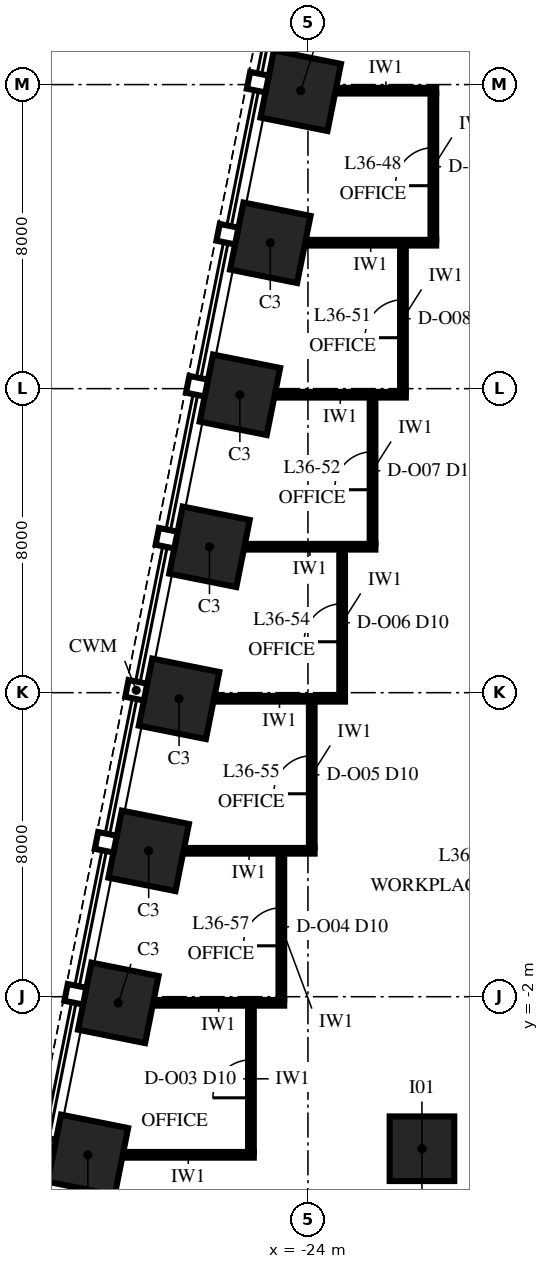
"""IFC4 building model, lengths in metres.
Left out: names, types, materials, properties, quantities, classifications, styles, units other than length and angle.
Written with IfcOpenShell. Run it as: python <this file> out.ifc"""

import sys

from ifc_helpers import new_model, si_unit, direction, frame, frame_2d, origin, origin_2d, place, context, subcontext, project, spatial, rectangle, extrude, element, fill, save


model = new_model("IFC4")
c1 = context("Model", 3, precision=1e-05, world=origin(), true_north=direction((0.0, 1.0)))
c2 = subcontext(c1, "Body", "Model", "MODEL_VIEW")
j1 = project(units=[si_unit("LENGTHUNIT", "METRE"), si_unit("PLANEANGLEUNIT", "RADIAN")], contexts=[c1])
p1 = place(None, origin())
s1 = spatial("IfcSite", under=j1, at=p1, CompositionType="ELEMENT")
p2 = place(p1, origin())
s2 = spatial("IfcBuilding", under=s1, at=p2, CompositionType="ELEMENT")
p3 = place(p2, frame((0.0, 0.0, 159.0)))
s3 = spatial("IfcBuildingStorey", under=s2, at=p3, CompositionType="ELEMENT", Elevation=159.0)
for number, where, z_axis, x_axis in (
    (1, (-24.191, 21.838, 0.0), (0.0, 0.0, 1.0), (-0.196, -0.981, 0.0)),
    (2, (-24.991, 17.838, 0.0), (0.0, 0.0, 1.0), (-0.196, -0.981, 0.0)),
    (3, (-25.791, 13.838, 0.0), (0.0, 0.0, 1.0), (-0.196, -0.981, 0.0)),
    (4, (-26.591, 9.838, 0.0), (0.0, 0.0, 1.0), (-0.196, -0.981, 0.0)),
    (5, (-27.391, 5.838, 0.0), (0.0, 0.0, 1.0), (-0.196, -0.981, 0.0)),
    (6, (-28.191, 1.838, 0.0), (0.0, 0.0, 1.0), (-0.196, -0.981, 0.0)),
    (7, (-28.991, -2.162, 0.0), (0.0, 0.0, 1.0), (-0.196, -0.981, 0.0)),
    (8, (-29.791, -6.162, 0.0), (0.0, 0.0, 1.0), (-0.196, -0.981, 0.0)),
):
    element("IfcColumn", number, at=place(p3, frame(where, z_axis=z_axis, x_axis=x_axis)), inside=s3, PredefinedType="COLUMN", context=c2, shape_type="SweptSolid", body=[
        extrude(rectangle(XDim=1.8, YDim=1.8, at=origin_2d()), origin(), (0.0, 0.0, 1.0), 4.0),
    ])
p4 = place(p3, frame((-21.0, -6.0, 0.0), z_axis=(0.0, 0.0, 1.0), x_axis=(1.0, 0.0, 0.0)))
e9 = element("IfcColumn", 9, at=p4, inside=s3, PredefinedType="COLUMN", context=c2, shape_type="SweptSolid", body=[
    extrude(rectangle(XDim=1.7, YDim=1.7, at=origin_2d()), origin(), (0.0, 0.0, 1.0), 4.0),
])
p5 = place(p3, frame((-28.873, -6.16, 0.0), z_axis=(0.0, 0.0, 1.0), x_axis=(1.0, 0.0, 0.0)))
e10 = element("IfcWall", 10, at=p5, inside=s3, PredefinedType="PARTITIONING", context=c2, shape_type="SweptSolid", body=[
    extrude(rectangle(XDim=3.448, YDim=0.15, at=frame_2d((1.724, 0.0))), origin(), (0.0, 0.0, 1.0), 2.842),
])
for number, where, z_axis, x_axis in (
    (11, (-28.073, -2.16, 0.0), (0.0, 0.0, 1.0), (1.0, 0.0, 0.0)),
    (12, (-27.273, 1.84, 0.0), (0.0, 0.0, 1.0), (1.0, 0.0, 0.0)),
):
    element("IfcWall", number, at=place(p3, frame(where, z_axis=z_axis, x_axis=x_axis)), inside=s3, PredefinedType="PARTITIONING", context=c2, shape_type="SweptSolid", body=[
        extrude(rectangle(XDim=3.448, YDim=0.15, at=frame_2d((1.724, 0.0))), origin(), (0.0, 0.0, 1.0), 3.25),
    ])
p6 = place(p3, frame((-26.473, 5.84, 0.0), z_axis=(0.0, 0.0, 1.0), x_axis=(1.0, 0.0, 0.0)))
e13 = element("IfcWall", 13, at=p6, inside=s3, PredefinedType="PARTITIONING", context=c2, shape_type="SweptSolid", body=[
    extrude(rectangle(XDim=3.448, YDim=0.15, at=frame_2d((1.724, 0.0))), origin(), (0.0, 0.0, 1.0), 2.842),
])
for number, where, z_axis, x_axis in (
    (14, (-25.673, 9.84, 0.0), (0.0, 0.0, 1.0), (1.0, 0.0, 0.0)),
    (15, (-24.873, 13.84, 0.0), (0.0, 0.0, 1.0), (1.0, 0.0, 0.0)),
    (16, (-24.073, 17.84, 0.0), (0.0, 0.0, 1.0), (1.0, 0.0, 0.0)),
):
    element("IfcWall", number, at=place(p3, frame(where, z_axis=z_axis, x_axis=x_axis)), inside=s3, PredefinedType="PARTITIONING", context=c2, shape_type="SweptSolid", body=[
        extrude(rectangle(XDim=3.448, YDim=0.15, at=frame_2d((1.724, 0.0))), origin(), (0.0, 0.0, 1.0), 3.25),
    ])
p7 = place(p3, frame((-23.273, 21.84, 0.0), z_axis=(0.0, 0.0, 1.0), x_axis=(1.0, 0.0, 0.0)))
e17 = element("IfcWall", 17, at=p7, inside=s3, PredefinedType="PARTITIONING", context=c2, shape_type="SweptSolid", body=[
    extrude(rectangle(XDim=2.648, YDim=0.15, at=frame_2d((1.324, 0.0))), origin(), (0.0, 0.0, 1.0), 3.25),
])
p8 = place(p3, frame((-25.5, -6.085, 0.0), z_axis=(0.0, 0.0, 1.0), x_axis=(0.0, 1.0, 0.0)))
e18 = element("IfcWall", 18, at=p8, inside=s3, PredefinedType="PARTITIONING", context=c2, shape_type="SweptSolid", body=[
    extrude(rectangle(XDim=3.85, YDim=0.15, at=frame_2d((1.925, 0.0))), origin(), (0.0, 0.0, 1.0), 2.842),
])
p9 = place(p8, frame((1.425, 0.0, 0.0)))
e19 = element("IfcOpeningElement", 19, at=p9, cuts=e18, PredefinedType="OPENING", context=c2, shape_type="SweptSolid", body=[
    extrude(rectangle(XDim=1.0, YDim=2.3, at=frame_2d((0.5, 1.15))), frame((0.0, 0.09, 0.0), z_axis=(0.0, -1.0, 0.0), x_axis=(1.0, 0.0, 0.0)), (0.0, 0.0, 1.0), 0.18),
])
p10 = place(p3, frame((-24.7, -2.085, 0.0), z_axis=(0.0, 0.0, 1.0), x_axis=(0.0, 1.0, 0.0)))
e20 = element("IfcWall", 20, at=p10, inside=s3, PredefinedType="PARTITIONING", context=c2, shape_type="SweptSolid", body=[
    extrude(rectangle(XDim=3.85, YDim=0.15, at=frame_2d((1.925, 0.0))), origin(), (0.0, 0.0, 1.0), 3.85),
])
p11 = place(p10, frame((1.425, 0.0, 0.0)))
e21 = element("IfcOpeningElement", 21, at=p11, cuts=e20, PredefinedType="OPENING", context=c2, shape_type="SweptSolid", body=[
    extrude(rectangle(XDim=1.0, YDim=2.3, at=frame_2d((0.5, 1.15))), frame((0.0, 0.09, 0.0), z_axis=(0.0, -1.0, 0.0), x_axis=(1.0, 0.0, 0.0)), (0.0, 0.0, 1.0), 0.18),
])
p12 = place(p3, frame((-23.9, 1.915, 0.0), z_axis=(0.0, 0.0, 1.0), x_axis=(0.0, 1.0, 0.0)))
e22 = element("IfcWall", 22, at=p12, inside=s3, PredefinedType="PARTITIONING", context=c2, shape_type="SweptSolid", body=[
    extrude(rectangle(XDim=3.85, YDim=0.15, at=frame_2d((1.925, 0.0))), origin(), (0.0, 0.0, 1.0), 3.85),
])
p13 = place(p12, frame((1.425, 0.0, 0.0)))
e23 = element("IfcOpeningElement", 23, at=p13, cuts=e22, PredefinedType="OPENING", context=c2, shape_type="SweptSolid", body=[
    extrude(rectangle(XDim=1.0, YDim=2.3, at=frame_2d((0.5, 1.15))), frame((0.0, 0.09, 0.0), z_axis=(0.0, -1.0, 0.0), x_axis=(1.0, 0.0, 0.0)), (0.0, 0.0, 1.0), 0.18),
])
p14 = place(p3, frame((-23.1, 5.915, 0.0), z_axis=(0.0, 0.0, 1.0), x_axis=(0.0, 1.0, 0.0)))
e24 = element("IfcWall", 24, at=p14, inside=s3, PredefinedType="PARTITIONING", context=c2, shape_type="SweptSolid", body=[
    extrude(rectangle(XDim=3.85, YDim=0.15, at=frame_2d((1.925, 0.0))), origin(), (0.0, 0.0, 1.0), 2.842),
])
p15 = place(p14, frame((1.425, 0.0, 0.0)))
e25 = element("IfcOpeningElement", 25, at=p15, cuts=e24, PredefinedType="OPENING", context=c2, shape_type="SweptSolid", body=[
    extrude(rectangle(XDim=1.0, YDim=2.3, at=frame_2d((0.5, 1.15))), frame((0.0, 0.09, 0.0), z_axis=(0.0, -1.0, 0.0), x_axis=(1.0, 0.0, 0.0)), (0.0, 0.0, 1.0), 0.18),
])
p16 = place(p3, frame((-22.3, 9.915, 0.0), z_axis=(0.0, 0.0, 1.0), x_axis=(0.0, 1.0, 0.0)))
e26 = element("IfcWall", 26, at=p16, inside=s3, PredefinedType="PARTITIONING", context=c2, shape_type="SweptSolid", body=[
    extrude(rectangle(XDim=3.85, YDim=0.15, at=frame_2d((1.925, 0.0))), origin(), (0.0, 0.0, 1.0), 3.85),
])
p17 = place(p16, frame((1.425, 0.0, 0.0)))
e27 = element("IfcOpeningElement", 27, at=p17, cuts=e26, PredefinedType="OPENING", context=c2, shape_type="SweptSolid", body=[
    extrude(rectangle(XDim=1.0, YDim=2.3, at=frame_2d((0.5, 1.15))), frame((0.0, 0.09, 0.0), z_axis=(0.0, -1.0, 0.0), x_axis=(1.0, 0.0, 0.0)), (0.0, 0.0, 1.0), 0.18),
])
p18 = place(p3, frame((-21.5, 13.915, 0.0), z_axis=(0.0, 0.0, 1.0), x_axis=(0.0, 1.0, 0.0)))
e28 = element("IfcWall", 28, at=p18, inside=s3, PredefinedType="PARTITIONING", context=c2, shape_type="SweptSolid", body=[
    extrude(rectangle(XDim=3.85, YDim=0.15, at=frame_2d((1.925, 0.0))), origin(), (0.0, 0.0, 1.0), 3.25),
])
p19 = place(p18, frame((1.425, 0.0, 0.0)))
e29 = element("IfcOpeningElement", 29, at=p19, cuts=e28, PredefinedType="OPENING", context=c2, shape_type="SweptSolid", body=[
    extrude(rectangle(XDim=1.0, YDim=2.3, at=frame_2d((0.5, 1.15))), frame((0.0, 0.09, 0.0), z_axis=(0.0, -1.0, 0.0), x_axis=(1.0, 0.0, 0.0)), (0.0, 0.0, 1.0), 0.18),
])
p20 = place(p3, frame((-20.7, 17.915, 0.0), z_axis=(0.0, 0.0, 1.0), x_axis=(0.0, 1.0, 0.0)))
e30 = element("IfcWall", 30, at=p20, inside=s3, PredefinedType="PARTITIONING", context=c2, shape_type="SweptSolid", body=[
    extrude(rectangle(XDim=3.85, YDim=0.15, at=frame_2d((1.925, 0.0))), origin(), (0.0, 0.0, 1.0), 3.25),
])
p21 = place(p20, frame((1.425, 0.0, 0.0)))
e31 = element("IfcOpeningElement", 31, at=p21, cuts=e30, PredefinedType="OPENING", context=c2, shape_type="SweptSolid", body=[
    extrude(rectangle(XDim=1.0, YDim=2.3, at=frame_2d((0.5, 1.15))), frame((0.0, 0.09, 0.0), z_axis=(0.0, -1.0, 0.0), x_axis=(1.0, 0.0, 0.0)), (0.0, 0.0, 1.0), 0.18),
])
p22 = place(p9, origin())
e32 = element("IfcDoor", 32, at=p22, inside=s3, OperationType="SINGLE_SWING_LEFT", PredefinedType="DOOR", context=c2, shape_type="SweptSolid", body=[
    extrude(rectangle(XDim=1.0, YDim=2.3, at=frame_2d((0.5, 1.15))), frame((0.0, 0.075, 0.0), z_axis=(0.0, -1.0, 0.0), x_axis=(1.0, 0.0, 0.0)), (0.0, 0.0, 1.0), 0.149),
])
fill(e19, e32)
p23 = place(p11, origin())
e33 = element("IfcDoor", 33, at=p23, inside=s3, OperationType="SINGLE_SWING_LEFT", PredefinedType="DOOR", context=c2, shape_type="SweptSolid", body=[
    extrude(rectangle(XDim=1.0, YDim=2.3, at=frame_2d((0.5, 1.15))), frame((0.0, 0.075, 0.0), z_axis=(0.0, -1.0, 0.0), x_axis=(1.0, 0.0, 0.0)), (0.0, 0.0, 1.0), 0.149),
])
fill(e21, e33)
p24 = place(p13, origin())
e34 = element("IfcDoor", 34, at=p24, inside=s3, OperationType="SINGLE_SWING_LEFT", PredefinedType="DOOR", context=c2, shape_type="SweptSolid", body=[
    extrude(rectangle(XDim=1.0, YDim=2.3, at=frame_2d((0.5, 1.15))), frame((0.0, 0.075, 0.0), z_axis=(0.0, -1.0, 0.0), x_axis=(1.0, 0.0, 0.0)), (0.0, 0.0, 1.0), 0.149),
])
fill(e23, e34)
p25 = place(p15, origin())
e35 = element("IfcDoor", 35, at=p25, inside=s3, OperationType="SINGLE_SWING_LEFT", PredefinedType="DOOR", context=c2, shape_type="SweptSolid", body=[
    extrude(rectangle(XDim=1.0, YDim=2.3, at=frame_2d((0.5, 1.15))), frame((0.0, 0.075, 0.0), z_axis=(0.0, -1.0, 0.0), x_axis=(1.0, 0.0, 0.0)), (0.0, 0.0, 1.0), 0.149),
])
fill(e25, e35)
p26 = place(p17, origin())
e36 = element("IfcDoor", 36, at=p26, inside=s3, OperationType="SINGLE_SWING_LEFT", PredefinedType="DOOR", context=c2, shape_type="SweptSolid", body=[
    extrude(rectangle(XDim=1.0, YDim=2.3, at=frame_2d((0.5, 1.15))), frame((0.0, 0.075, 0.0), z_axis=(0.0, -1.0, 0.0), x_axis=(1.0, 0.0, 0.0)), (0.0, 0.0, 1.0), 0.149),
])
fill(e27, e36)
p27 = place(p19, origin())
e37 = element("IfcDoor", 37, at=p27, inside=s3, OperationType="SINGLE_SWING_LEFT", PredefinedType="DOOR", context=c2, shape_type="SweptSolid", body=[
    extrude(rectangle(XDim=1.0, YDim=2.3, at=frame_2d((0.5, 1.15))), frame((0.0, 0.075, 0.0), z_axis=(0.0, -1.0, 0.0), x_axis=(1.0, 0.0, 0.0)), (0.0, 0.0, 1.0), 0.149),
])
fill(e29, e37)
p28 = place(p21, origin())
e38 = element("IfcDoor", 38, at=p28, inside=s3, OperationType="SINGLE_SWING_LEFT", PredefinedType="DOOR", context=c2, shape_type="SweptSolid", body=[
    extrude(rectangle(XDim=1.0, YDim=2.3, at=frame_2d((0.5, 1.15))), frame((0.0, 0.075, 0.0), z_axis=(0.0, -1.0, 0.0), x_axis=(1.0, 0.0, 0.0)), (0.0, 0.0, 1.0), 0.149),
])
fill(e31, e38)
save(model, sys.argv[1])
